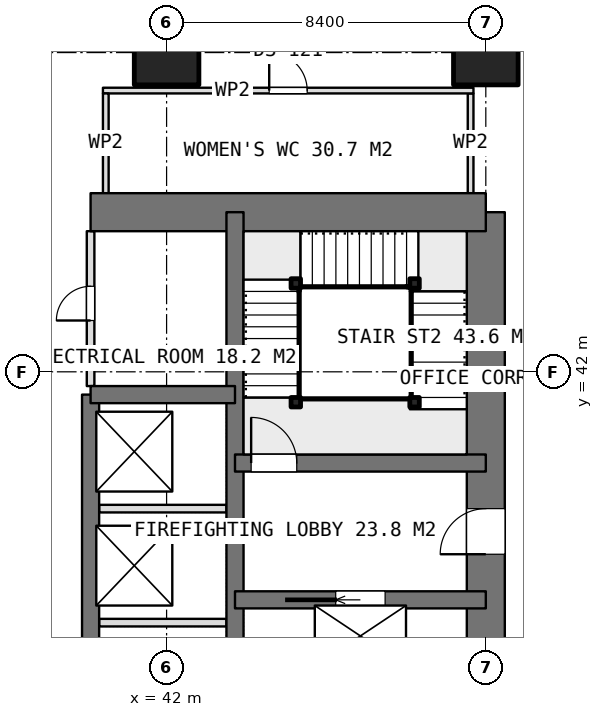
"""IFC4 building model, lengths in metres.
Left out: names, types, materials, properties, quantities, classifications, styles, units other than length and angle.
Written with IfcOpenShell. Run it as: python <this file> out.ifc"""

import sys

from ifc_helpers import new_model, si_unit, direction, frame, frame_2d, origin, origin_2d, place, context, subcontext, project, spatial, rectangle, extrude, element, fill, save


model = new_model("IFC4")
c1 = context("Model", 3, precision=1e-05, world=origin(), true_north=direction((0.0, 1.0)))
c2 = subcontext(c1, "Body", "Model", "MODEL_VIEW")
j1 = project(units=[si_unit("LENGTHUNIT", "METRE"), si_unit("PLANEANGLEUNIT", "RADIAN")], contexts=[c1])
p1 = place(None, origin())
s1 = spatial("IfcSite", under=j1, at=p1, CompositionType="ELEMENT")
p2 = place(p1, origin())
s2 = spatial("IfcBuilding", under=s1, at=p2, CompositionType="ELEMENT")
p3 = place(p2, frame((0.0, 0.0, 114.05)))
s3 = spatial("IfcBuildingStorey", under=s2, at=p3, CompositionType="ELEMENT", Elevation=114.05)
p4 = place(p3, frame((40.0, 46.2, 0.0), z_axis=(0.0, 0.0, 1.0), x_axis=(1.0, 0.0, 0.0)))
e1 = element("IfcWall", 1, at=p4, inside=s3, PredefinedType="SHEAR", context=c2, shape_type="SweptSolid", body=[
    extrude(rectangle(XDim=10.4, YDim=1.0, at=frame_2d((5.2, 0.0))), origin(), (0.0, 0.0, 1.0), 3.75),
])
p5 = place(p3, frame((50.4, 21.0, 0.0), z_axis=(0.0, 0.0, 1.0), x_axis=(0.0, 1.0, 0.0)))
e2 = element("IfcWall", 2, at=p5, inside=s3, PredefinedType="SHEAR", context=c2, shape_type="SweptSolid", body=[
    extrude(rectangle(XDim=25.2, YDim=1.0, at=frame_2d((12.6, 0.0))), origin(), (0.0, 0.0, 1.0), 3.75),
])
p6 = place(p5, frame((16.2, 0.0, 0.0)))
e3 = element("IfcOpeningElement", 3, at=p6, cuts=e2, PredefinedType="OPENING", context=c2, shape_type="SweptSolid", body=[
    extrude(rectangle(XDim=1.2, YDim=2.1, at=frame_2d((0.6, 1.05))), frame((0.0, 0.51, 0.0), z_axis=(0.0, -1.0, 0.0), x_axis=(1.0, 0.0, 0.0)), (0.0, 0.0, 1.0), 1.02),
])
p7 = place(p5, frame((10.05, 0.0, 0.0)))
e4 = element("IfcOpeningElement", 4, at=p7, cuts=e2, PredefinedType="OPENING", context=c2, shape_type="SweptSolid", body=[
    extrude(rectangle(XDim=0.9, YDim=2.1, at=frame_2d((0.45, 1.05))), frame((0.0, 0.51, 0.0), z_axis=(0.0, -1.0, 0.0), x_axis=(1.0, 0.0, 0.0)), (0.0, 0.0, 1.0), 1.02),
])
p8 = place(p5, frame((7.45, 0.0, 0.0)))
e5 = element("IfcOpeningElement", 5, at=p8, cuts=e2, PredefinedType="OPENING", context=c2, shape_type="SweptSolid", body=[
    extrude(rectangle(XDim=0.9, YDim=2.1, at=frame_2d((0.45, 1.05))), frame((0.0, 0.51, 0.0), z_axis=(0.0, -1.0, 0.0), x_axis=(1.0, 0.0, 0.0)), (0.0, 0.0, 1.0), 1.02),
])
p9 = place(p5, frame((0.7, 0.0, 0.0)))
e6 = element("IfcOpeningElement", 6, at=p9, cuts=e2, PredefinedType="OPENING", context=c2, shape_type="SweptSolid", body=[
    extrude(rectangle(XDim=1.2, YDim=2.1, at=frame_2d((0.6, 1.05))), frame((0.0, 0.51, 0.0), z_axis=(0.0, -1.0, 0.0), x_axis=(1.0, 0.0, 0.0)), (0.0, 0.0, 1.0), 1.02),
])
p10 = place(p3, frame((43.8, 21.0, 0.0), z_axis=(0.0, 0.0, 1.0), x_axis=(0.0, 1.0, 0.0)))
e7 = element("IfcWall", 7, at=p10, inside=s3, PredefinedType="SHEAR", context=c2, shape_type="SweptSolid", body=[
    extrude(rectangle(XDim=25.2, YDim=0.45, at=frame_2d((12.6, 0.0))), origin(), (0.0, 0.0, 1.0), 3.75),
])
p11 = place(p3, frame((40.0, 23.4, 0.0), z_axis=(0.0, 0.0, 1.0), x_axis=(0.0, 1.0, 0.0)))
e8 = element("IfcWall", 8, at=p11, inside=s3, PredefinedType="SHEAR", context=c2, shape_type="SweptSolid", body=[
    extrude(rectangle(XDim=18.0, YDim=0.45, at=frame_2d((9.0, 0.0))), origin(), (0.0, 0.0, 1.0), 3.75),
])
p12 = place(p11, frame((2.55, 0.0, 0.0)))
e9 = element("IfcOpeningElement", 9, at=p12, cuts=e8, PredefinedType="OPENING", context=c2, shape_type="SweptSolid", body=[
    extrude(rectangle(XDim=0.9, YDim=2.1, at=frame_2d((0.45, 1.05))), frame((0.0, 0.235, 0.0), z_axis=(0.0, -1.0, 0.0), x_axis=(1.0, 0.0, 0.0)), (0.0, 0.0, 1.0), 0.47),
])
p13 = place(p3, frame((40.0, 41.4, 0.0), z_axis=(0.0, 0.0, 1.0), x_axis=(1.0, 0.0, 0.0)))
e10 = element("IfcWall", 10, at=p13, inside=s3, PredefinedType="SHEAR", context=c2, shape_type="SweptSolid", body=[
    extrude(rectangle(XDim=3.8, YDim=0.45, at=frame_2d((1.9, 0.0))), origin(), (0.0, 0.0, 1.0), 3.75),
])
p14 = place(p3, frame((43.8, 36.0, 0.0), z_axis=(0.0, 0.0, 1.0), x_axis=(1.0, 0.0, 0.0)))
e11 = element("IfcWall", 11, at=p14, inside=s3, PredefinedType="SHEAR", context=c2, shape_type="SweptSolid", body=[
    extrude(rectangle(XDim=6.6, YDim=0.45, at=frame_2d((3.3, 0.0))), origin(), (0.0, 0.0, 1.0), 3.75),
])
p15 = place(p14, frame((2.65, 0.0, 0.0)))
e12 = element("IfcOpeningElement", 12, at=p15, cuts=e11, PredefinedType="OPENING", context=c2, shape_type="SweptSolid", body=[
    extrude(rectangle(XDim=1.3, YDim=2.1, at=frame_2d((0.65, 1.05))), frame((0.0, 0.235, 0.0), z_axis=(0.0, -1.0, 0.0), x_axis=(1.0, 0.0, 0.0)), (0.0, 0.0, 1.0), 0.47),
])
p16 = place(p3, frame((43.8, 39.6, 0.0), z_axis=(0.0, 0.0, 1.0), x_axis=(1.0, 0.0, 0.0)))
e13 = element("IfcWall", 13, at=p16, inside=s3, PredefinedType="SHEAR", context=c2, shape_type="SweptSolid", body=[
    extrude(rectangle(XDim=6.6, YDim=0.45, at=frame_2d((3.3, 0.0))), origin(), (0.0, 0.0, 1.0), 3.75),
])
p17 = place(p16, frame((0.425, 0.0, 0.0)))
e14 = element("IfcOpeningElement", 14, at=p17, cuts=e13, PredefinedType="OPENING", context=c2, shape_type="SweptSolid", body=[
    extrude(rectangle(XDim=1.2, YDim=2.1, at=frame_2d((0.6, 1.05))), frame((0.0, 0.235, 0.0), z_axis=(0.0, -1.0, 0.0), x_axis=(1.0, 0.0, 0.0)), (0.0, 0.0, 1.0), 0.47),
])
for number, where, z_axis, x_axis in (
    (15, (42.0, 50.4, 0.0), (0.0, 0.0, 1.0), (1.0, 0.0, 0.0)),
    (16, (50.4, 50.4, 0.0), (0.0, 0.0, 1.0), (1.0, 0.0, 0.0)),
):
    element("IfcColumn", number, at=place(p3, frame(where, z_axis=z_axis, x_axis=x_axis)), inside=s3, PredefinedType="COLUMN", context=c2, shape_type="SweptSolid", body=[
        extrude(rectangle(XDim=1.7, YDim=1.7, at=origin_2d()), origin(), (0.0, 0.0, 1.0), 3.75),
    ])
for number, where, z_axis, x_axis in (
    (17, (40.225, 35.4, 0.0), (0.0, 0.0, 1.0), (1.0, 0.0, 0.0)),
    (18, (40.225, 38.4, 0.0), (0.0, 0.0, 1.0), (1.0, 0.0, 0.0)),
):
    element("IfcWall", number, at=place(p3, frame(where, z_axis=z_axis, x_axis=x_axis)), inside=s3, PredefinedType="PARTITIONING", context=c2, shape_type="SweptSolid", body=[
        extrude(rectangle(XDim=3.35, YDim=0.2, at=frame_2d((1.675, 0.0))), origin(), (0.0, 0.0, 1.0), 3.5),
    ])
p18 = place(p3, frame((40.0, 41.625, 0.0), z_axis=(0.0, 0.0, 1.0), x_axis=(0.0, 1.0, 0.0)))
e19 = element("IfcWall", 19, at=p18, inside=s3, PredefinedType="PARTITIONING", context=c2, shape_type="SweptSolid", body=[
    extrude(rectangle(XDim=4.075, YDim=0.2, at=frame_2d((2.038, 0.0))), origin(), (0.0, 0.0, 1.0), 3.5),
])
p19 = place(p18, frame((1.725, 0.0, 0.0)))
e20 = element("IfcOpeningElement", 20, at=p19, cuts=e19, PredefinedType="OPENING", context=c2, shape_type="SweptSolid", body=[
    extrude(rectangle(XDim=0.9, YDim=2.1, at=frame_2d((0.45, 1.05))), frame((0.0, 0.11, 0.0), z_axis=(0.0, -1.0, 0.0), x_axis=(1.0, 0.0, 0.0)), (0.0, 0.0, 1.0), 0.22),
])
p20 = place(p3, frame((40.325, 49.4, 0.0), z_axis=(0.0, 0.0, 1.0), x_axis=(1.0, 0.0, 0.0)))
e21 = element("IfcWall", 21, at=p20, inside=s3, PredefinedType="PARTITIONING", context=c2, shape_type="SweptSolid", body=[
    extrude(rectangle(XDim=9.75, YDim=0.15, at=frame_2d((4.875, 0.0))), origin(), (0.0, 0.0, 1.0), 3.5),
])
p21 = place(p20, frame((4.375, 0.0, 0.0)))
e22 = element("IfcOpeningElement", 22, at=p21, cuts=e21, PredefinedType="OPENING", context=c2, shape_type="SweptSolid", body=[
    extrude(rectangle(XDim=1.0, YDim=2.1, at=frame_2d((0.5, 1.05))), frame((0.0, 0.085, 0.0), z_axis=(0.0, -1.0, 0.0), x_axis=(1.0, 0.0, 0.0)), (0.0, 0.0, 1.0), 0.17),
])
for number, where, z_axis, x_axis in (
    (23, (40.4, 46.7, 0.0), (0.0, 0.0, 1.0), (0.0, 1.0, 0.0)),
    (24, (50.0, 46.7, 0.0), (0.0, 0.0, 1.0), (0.0, 1.0, 0.0)),
):
    element("IfcWall", number, at=place(p3, frame(where, z_axis=z_axis, x_axis=x_axis)), inside=s3, PredefinedType="PARTITIONING", context=c2, shape_type="SweptSolid", body=[
        extrude(rectangle(XDim=2.625, YDim=0.15, at=frame_2d((1.312, 0.0))), origin(), (0.0, 0.0, 1.0), 3.5),
    ])
for number, where, z_axis, x_axis in (
    (25, (45.4, 41.2, 0.0), (0.0, 0.0, 1.0), (1.0, 0.0, 0.0)),
    (26, (45.4, 44.325, 0.0), (0.0, 0.0, 1.0), (1.0, 0.0, 0.0)),
    (27, (48.525, 44.325, 0.0), (0.0, 0.0, 1.0), (1.0, 0.0, 0.0)),
    (28, (48.525, 41.2, 0.0), (0.0, 0.0, 1.0), (1.0, 0.0, 0.0)),
):
    element("IfcColumn", number, at=place(p3, frame(where, z_axis=z_axis, x_axis=x_axis)), inside=s3, PredefinedType="COLUMN", context=c2, shape_type="SweptSolid", body=[
        extrude(rectangle(XDim=0.25, YDim=0.25, at=origin_2d()), origin(), (0.0, 0.0, 1.0), 3.75),
    ])
p22 = place(p6, origin())
e29 = element("IfcDoor", 29, at=p22, inside=s3, OperationType="SINGLE_SWING_LEFT", PredefinedType="DOOR", context=c2, shape_type="SweptSolid", body=[
    extrude(rectangle(XDim=1.2, YDim=2.1, at=frame_2d((0.6, 1.05))), frame((0.0, 0.025, 0.0), z_axis=(0.0, -1.0, 0.0), x_axis=(1.0, 0.0, 0.0)), (0.0, 0.0, 1.0), 0.05),
])
fill(e3, e29)
p23 = place(p19, origin())
e30 = element("IfcDoor", 30, at=p23, inside=s3, OperationType="SINGLE_SWING_LEFT", PredefinedType="DOOR", context=c2, shape_type="SweptSolid", body=[
    extrude(rectangle(XDim=0.9, YDim=2.1, at=frame_2d((0.45, 1.05))), frame((0.0, 0.025, 0.0), z_axis=(0.0, -1.0, 0.0), x_axis=(1.0, 0.0, 0.0)), (0.0, 0.0, 1.0), 0.05),
])
fill(e20, e30)
p24 = place(p15, origin())
e31 = element("IfcDoor", 31, at=p24, inside=s3, OperationType="SLIDING_TO_LEFT", PredefinedType="USERDEFINED", context=c2, shape_type="SweptSolid", body=[
    extrude(rectangle(XDim=1.3, YDim=2.1, at=frame_2d((0.65, 1.05))), frame((0.0, 0.025, 0.0), z_axis=(0.0, -1.0, 0.0), x_axis=(1.0, 0.0, 0.0)), (0.0, 0.0, 1.0), 0.05),
])
fill(e12, e31)
p25 = place(p21, origin())
e32 = element("IfcDoor", 32, at=p25, inside=s3, OperationType="SINGLE_SWING_LEFT", PredefinedType="DOOR", context=c2, shape_type="SweptSolid", body=[
    extrude(rectangle(XDim=1.0, YDim=2.1, at=frame_2d((0.5, 1.05))), frame((0.0, 0.025, 0.0), z_axis=(0.0, -1.0, 0.0), x_axis=(1.0, 0.0, 0.0)), (0.0, 0.0, 1.0), 0.05),
])
fill(e22, e32)
p26 = place(p17, origin())
e33 = element("IfcDoor", 33, at=p26, inside=s3, OperationType="SINGLE_SWING_RIGHT", PredefinedType="DOOR", context=c2, shape_type="SweptSolid", body=[
    extrude(rectangle(XDim=1.2, YDim=2.1, at=frame_2d((0.6, 1.05))), frame((0.0, 0.025, 0.0), z_axis=(0.0, -1.0, 0.0), x_axis=(1.0, 0.0, 0.0)), (0.0, 0.0, 1.0), 0.05),
])
fill(e14, e33)
save(model, sys.argv[1])
